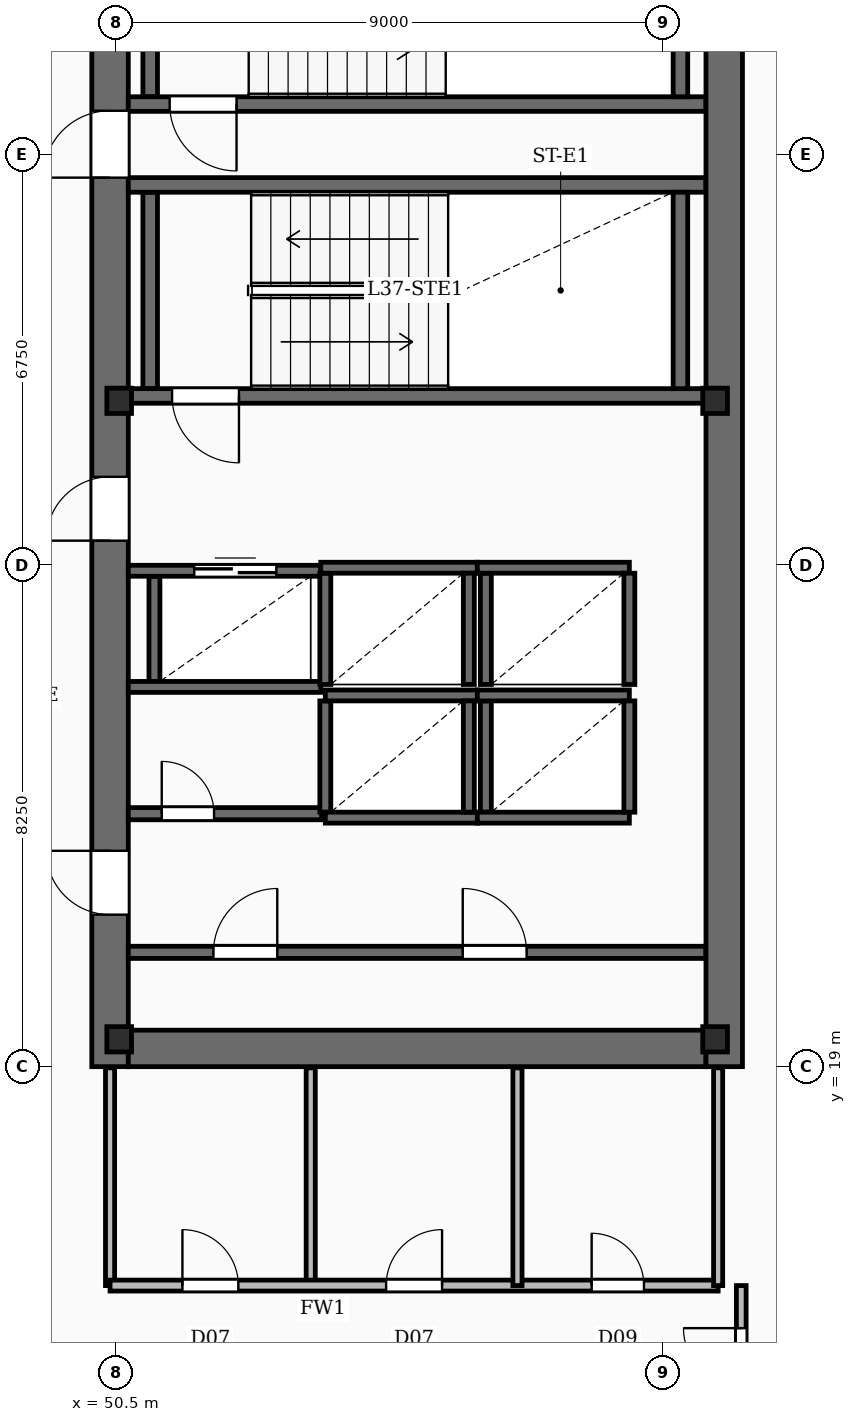
"""IFC4 building model, lengths in metres.
Left out: names, types, materials, properties, quantities, classifications, styles, units other than length and angle.
Written with IfcOpenShell. Run it as: python <this file> out.ifc"""

import sys

from ifc_helpers import new_model, si_unit, direction, frame, frame_2d, origin, origin_2d, place, context, subcontext, project, spatial, rectangle, i_section, extrude, element, fill, save


model = new_model("IFC4")
c1 = context("Model", 3, precision=1e-05, world=origin(), true_north=direction((0.0, 1.0)))
c2 = subcontext(c1, "Body", "Model", "MODEL_VIEW")
j1 = project(units=[si_unit("LENGTHUNIT", "METRE"), si_unit("PLANEANGLEUNIT", "RADIAN")], contexts=[c1])
p1 = place(None, origin())
s1 = spatial("IfcSite", under=j1, at=p1, CompositionType="ELEMENT")
p2 = place(p1, origin())
s2 = spatial("IfcBuilding", under=s1, at=p2, CompositionType="ELEMENT")
p3 = place(p2, frame((0.0, 0.0, 158.45)))
s3 = spatial("IfcBuildingStorey", under=s2, at=p3, CompositionType="ELEMENT", Elevation=158.45)
p4 = place(p3, frame((50.4, 19.0, -0.45), z_axis=(0.0, 0.0, 1.0), x_axis=(0.0, 1.0, 0.0)))
e1 = element("IfcWall", 1, at=p4, inside=s3, PredefinedType="SHEAR", context=c2, shape_type="SweptSolid", body=[
    extrude(rectangle(XDim=20.8, YDim=0.6, at=frame_2d((10.4, 0.0))), origin(), (0.0, 0.0, 1.0), 3.93),
])
p5 = place(p4, frame((2.5, 0.0, 0.45)))
e2 = element("IfcOpeningElement", 2, at=p5, cuts=e1, PredefinedType="OPENING", context=c2, shape_type="SweptSolid", body=[
    extrude(rectangle(XDim=1.05, YDim=2.15, at=frame_2d((0.525, 1.075))), frame((0.0, 0.31, 0.0), z_axis=(0.0, -1.0, 0.0), x_axis=(1.0, 0.0, 0.0)), (0.0, 0.0, 1.0), 0.62),
])
p6 = place(p4, frame((8.65, 0.0, 0.45)))
e3 = element("IfcOpeningElement", 3, at=p6, cuts=e1, PredefinedType="OPENING", context=c2, shape_type="SweptSolid", body=[
    extrude(rectangle(XDim=1.05, YDim=2.15, at=frame_2d((0.525, 1.075))), frame((0.0, 0.31, 0.0), z_axis=(0.0, -1.0, 0.0), x_axis=(1.0, 0.0, 0.0)), (0.0, 0.0, 1.0), 0.62),
])
p7 = place(p4, frame((14.62, 0.0, 0.45)))
e4 = element("IfcOpeningElement", 4, at=p7, cuts=e1, PredefinedType="OPENING", context=c2, shape_type="SweptSolid", body=[
    extrude(rectangle(XDim=1.1, YDim=2.15, at=frame_2d((0.55, 1.075))), frame((0.0, 0.31, 0.0), z_axis=(0.0, -1.0, 0.0), x_axis=(1.0, 0.0, 0.0)), (0.0, 0.0, 1.0), 0.62),
])
p8 = place(p3, frame((60.5, 19.0, -0.45), z_axis=(0.0, 0.0, 1.0), x_axis=(0.0, 1.0, 0.0)))
e5 = element("IfcWall", 5, at=p8, inside=s3, PredefinedType="SHEAR", context=c2, shape_type="SweptSolid", body=[
    extrude(rectangle(XDim=20.8, YDim=0.6, at=frame_2d((10.4, 0.0))), origin(), (0.0, 0.0, 1.0), 3.93),
])
p9 = place(p3, frame((50.7, 19.3, -0.45), z_axis=(0.0, 0.0, 1.0), x_axis=(1.0, 0.0, 0.0)))
e6 = element("IfcWall", 6, at=p9, inside=s3, PredefinedType="SHEAR", context=c2, shape_type="SweptSolid", body=[
    extrude(rectangle(XDim=9.5, YDim=0.6, at=frame_2d((4.75, 0.0))), origin(), (0.0, 0.0, 1.0), 3.93),
])
for number, where, z_axis, x_axis in (
    (7, (50.55, 19.45, -0.45), (0.0, 0.0, 1.0), (1.0, 0.0, 0.0)),
    (8, (60.35, 19.45, -0.45), (0.0, 0.0, 1.0), (1.0, 0.0, 0.0)),
    (9, (50.55, 29.95, -0.45), (0.0, 0.0, 1.0), (1.0, 0.0, 0.0)),
    (10, (60.35, 29.95, -0.45), (0.0, 0.0, 1.0), (1.0, 0.0, 0.0)),
):
    element("IfcColumn", number, at=place(p3, frame(where, z_axis=z_axis, x_axis=x_axis)), inside=s3, PredefinedType="COLUMN", context=c2, shape_type="SweptSolid", body=[
        extrude(i_section(OverallWidth=0.406, OverallDepth=0.416, WebThickness=0.03, FlangeThickness=0.048, FilletRadius=0.02, at=origin_2d()), origin(), (0.0, 0.0, 1.0), 3.93),
    ])
p10 = place(p3, frame((60.2, 30.03, 0.0), z_axis=(0.0, 0.0, 1.0), x_axis=(-1.0, 0.0, 0.0)))
e11 = element("IfcWall", 11, at=p10, inside=s3, PredefinedType="SOLIDWALL", context=c2, shape_type="SweptSolid", body=[
    extrude(rectangle(XDim=9.5, YDim=0.24, at=frame_2d((4.75, 0.0))), origin(), (0.0, 0.0, 1.0), 3.48),
])
p11 = place(p10, frame((7.68, 0.0, 0.0)))
e12 = element("IfcOpeningElement", 12, at=p11, cuts=e11, PredefinedType="OPENING", context=c2, shape_type="SweptSolid", body=[
    extrude(rectangle(XDim=1.1, YDim=2.15, at=frame_2d((0.55, 1.075))), frame((0.0, 0.13, 0.0), z_axis=(0.0, -1.0, 0.0), x_axis=(1.0, 0.0, 0.0)), (0.0, 0.0, 1.0), 0.26),
])
p12 = place(p3, frame((50.7, 33.5, 0.0), z_axis=(0.0, 0.0, 1.0), x_axis=(1.0, 0.0, 0.0)))
e13 = element("IfcWall", 13, at=p12, inside=s3, PredefinedType="SOLIDWALL", context=c2, shape_type="SweptSolid", body=[
    extrude(rectangle(XDim=9.5, YDim=0.24, at=frame_2d((4.75, 0.0))), origin(), (0.0, 0.0, 1.0), 3.48),
])
for number, where, z_axis, x_axis in (
    (14, (51.06, 30.15, 0.0), (0.0, 0.0, 1.0), (0.0, 1.0, 0.0)),
    (15, (59.78, 30.15, 0.0), (0.0, 0.0, 1.0), (0.0, 1.0, 0.0)),
):
    element("IfcWall", number, at=place(p3, frame(where, z_axis=z_axis, x_axis=x_axis)), inside=s3, PredefinedType="SOLIDWALL", context=c2, shape_type="SweptSolid", body=[
        extrude(rectangle(XDim=3.23, YDim=0.24, at=frame_2d((1.615, 0.0))), origin(), (0.0, 0.0, 1.0), 3.48),
    ])
p13 = place(p3, frame((60.2, 34.83, 0.0), z_axis=(0.0, 0.0, 1.0), x_axis=(-1.0, 0.0, 0.0)))
e16 = element("IfcWall", 16, at=p13, inside=s3, PredefinedType="SOLIDWALL", context=c2, shape_type="SweptSolid", body=[
    extrude(rectangle(XDim=9.5, YDim=0.24, at=frame_2d((4.75, 0.0))), origin(), (0.0, 0.0, 1.0), 3.48),
])
p14 = place(p13, frame((7.72, 0.0, 0.0)))
e17 = element("IfcOpeningElement", 17, at=p14, cuts=e16, PredefinedType="OPENING", context=c2, shape_type="SweptSolid", body=[
    extrude(rectangle(XDim=1.1, YDim=2.15, at=frame_2d((0.55, 1.075))), frame((0.0, 0.13, 0.0), z_axis=(0.0, -1.0, 0.0), x_axis=(1.0, 0.0, 0.0)), (0.0, 0.0, 1.0), 0.26),
])
for number, where, z_axis, x_axis in (
    (18, (51.06, 34.95, 0.0), (0.0, 0.0, 1.0), (0.0, 1.0, 0.0)),
    (19, (59.78, 34.95, 0.0), (0.0, 0.0, 1.0), (0.0, 1.0, 0.0)),
):
    element("IfcWall", number, at=place(p3, frame(where, z_axis=z_axis, x_axis=x_axis)), inside=s3, PredefinedType="SOLIDWALL", context=c2, shape_type="SweptSolid", body=[
        extrude(rectangle(XDim=3.15, YDim=0.24, at=frame_2d((1.575, 0.0))), origin(), (0.0, 0.0, 1.0), 3.48),
    ])
for number, where, z_axis, x_axis in (
    (20, (53.94, 25.105, 0.0), (0.0, 0.0, 1.0), (1.0, 0.0, 0.0)),
    (21, (53.94, 23.095, 0.0), (0.0, 0.0, 1.0), (1.0, 0.0, 0.0)),
):
    element("IfcWall", number, at=place(p3, frame(where, z_axis=z_axis, x_axis=x_axis)), inside=s3, PredefinedType="SOLIDWALL", context=c2, shape_type="SweptSolid", body=[
        extrude(rectangle(XDim=2.5, YDim=0.18, at=frame_2d((1.25, 0.0))), origin(), (0.0, 0.0, 1.0), 3.48),
    ])
for number, where, z_axis, x_axis in (
    (22, (53.94, 23.185, 0.0), (0.0, 0.0, 1.0), (0.0, 1.0, 0.0)),
    (23, (56.3, 23.185, 0.0), (0.0, 0.0, 1.0), (0.0, 1.0, 0.0)),
):
    element("IfcWall", number, at=place(p3, frame(where, z_axis=z_axis, x_axis=x_axis)), inside=s3, PredefinedType="SOLIDWALL", context=c2, shape_type="SweptSolid", body=[
        extrude(rectangle(XDim=1.83, YDim=0.18, at=frame_2d((0.915, 0.0))), origin(), (0.0, 0.0, 1.0), 3.48),
    ])
for number, where, z_axis, x_axis in (
    (24, (56.44, 25.105, 0.0), (0.0, 0.0, 1.0), (1.0, 0.0, 0.0)),
    (25, (56.44, 23.095, 0.0), (0.0, 0.0, 1.0), (1.0, 0.0, 0.0)),
):
    element("IfcWall", number, at=place(p3, frame(where, z_axis=z_axis, x_axis=x_axis)), inside=s3, PredefinedType="SOLIDWALL", context=c2, shape_type="SweptSolid", body=[
        extrude(rectangle(XDim=2.5, YDim=0.18, at=frame_2d((1.25, 0.0))), origin(), (0.0, 0.0, 1.0), 3.48),
    ])
for number, where, z_axis, x_axis in (
    (26, (56.58, 23.185, 0.0), (0.0, 0.0, 1.0), (0.0, 1.0, 0.0)),
    (27, (58.94, 23.185, 0.0), (0.0, 0.0, 1.0), (0.0, 1.0, 0.0)),
):
    element("IfcWall", number, at=place(p3, frame(where, z_axis=z_axis, x_axis=x_axis)), inside=s3, PredefinedType="SOLIDWALL", context=c2, shape_type="SweptSolid", body=[
        extrude(rectangle(XDim=1.83, YDim=0.18, at=frame_2d((0.915, 0.0))), origin(), (0.0, 0.0, 1.0), 3.48),
    ])
p15 = place(p3, frame((53.865, 27.205, 0.0), z_axis=(0.0, 0.0, 1.0), x_axis=(1.0, 0.0, 0.0)))
e28 = element("IfcWall", 28, at=p15, inside=s3, PredefinedType="SOLIDWALL", context=c2, shape_type="SweptSolid", body=[
    extrude(rectangle(XDim=2.575, YDim=0.18, at=frame_2d((1.288, 0.0))), origin(), (0.0, 0.0, 1.0), 3.48),
])
for number, where, z_axis, x_axis in (
    (29, (53.94, 25.285, 0.0), (0.0, 0.0, 1.0), (0.0, 1.0, 0.0)),
    (30, (56.3, 25.285, 0.0), (0.0, 0.0, 1.0), (0.0, 1.0, 0.0)),
):
    element("IfcWall", number, at=place(p3, frame(where, z_axis=z_axis, x_axis=x_axis)), inside=s3, PredefinedType="SOLIDWALL", context=c2, shape_type="SweptSolid", body=[
        extrude(rectangle(XDim=1.83, YDim=0.18, at=frame_2d((0.915, 0.0))), origin(), (0.0, 0.0, 1.0), 3.48),
    ])
p16 = place(p3, frame((56.44, 27.205, 0.0), z_axis=(0.0, 0.0, 1.0), x_axis=(1.0, 0.0, 0.0)))
e31 = element("IfcWall", 31, at=p16, inside=s3, PredefinedType="SOLIDWALL", context=c2, shape_type="SweptSolid", body=[
    extrude(rectangle(XDim=2.5, YDim=0.18, at=frame_2d((1.25, 0.0))), origin(), (0.0, 0.0, 1.0), 3.48),
])
for number, where, z_axis, x_axis in (
    (32, (56.58, 25.285, 0.0), (0.0, 0.0, 1.0), (0.0, 1.0, 0.0)),
    (33, (58.94, 25.285, 0.0), (0.0, 0.0, 1.0), (0.0, 1.0, 0.0)),
):
    element("IfcWall", number, at=place(p3, frame(where, z_axis=z_axis, x_axis=x_axis)), inside=s3, PredefinedType="SOLIDWALL", context=c2, shape_type="SweptSolid", body=[
        extrude(rectangle(XDim=1.83, YDim=0.18, at=frame_2d((0.915, 0.0))), origin(), (0.0, 0.0, 1.0), 3.48),
    ])
p17 = place(p3, frame((50.7, 27.155, 0.0), z_axis=(0.0, 0.0, 1.0), x_axis=(1.0, 0.0, 0.0)))
e34 = element("IfcWall", 34, at=p17, inside=s3, PredefinedType="SOLIDWALL", context=c2, shape_type="SweptSolid", body=[
    extrude(rectangle(XDim=3.165, YDim=0.18, at=frame_2d((1.583, 0.0))), origin(), (0.0, 0.0, 1.0), 3.48),
])
p18 = place(p17, frame((1.085, 0.0, 0.0)))
e35 = element("IfcOpeningElement", 35, at=p18, cuts=e34, PredefinedType="OPENING", context=c2, shape_type="SweptSolid", body=[
    extrude(rectangle(XDim=1.35, YDim=2.3, at=frame_2d((0.675, 1.15))), frame((0.0, 0.1, 0.0), z_axis=(0.0, -1.0, 0.0), x_axis=(1.0, 0.0, 0.0)), (0.0, 0.0, 1.0), 0.2),
])
p19 = place(p3, frame((50.7, 25.245, 0.0), z_axis=(0.0, 0.0, 1.0), x_axis=(1.0, 0.0, 0.0)))
e36 = element("IfcWall", 36, at=p19, inside=s3, PredefinedType="SOLIDWALL", context=c2, shape_type="SweptSolid", body=[
    extrude(rectangle(XDim=3.165, YDim=0.18, at=frame_2d((1.583, 0.0))), origin(), (0.0, 0.0, 1.0), 3.48),
])
p20 = place(p3, frame((51.13, 25.335, 0.0), z_axis=(0.0, 0.0, 1.0), x_axis=(0.0, 1.0, 0.0)))
e37 = element("IfcWall", 37, at=p20, inside=s3, PredefinedType="SOLIDWALL", context=c2, shape_type="SweptSolid", body=[
    extrude(rectangle(XDim=1.73, YDim=0.18, at=frame_2d((0.865, 0.0))), origin(), (0.0, 0.0, 1.0), 3.48),
])
p21 = place(p3, frame((50.7, 20.88, 0.0), z_axis=(0.0, 0.0, 1.0), x_axis=(1.0, 0.0, 0.0)))
e38 = element("IfcWall", 38, at=p21, inside=s3, PredefinedType="SOLIDWALL", context=c2, shape_type="SweptSolid", body=[
    extrude(rectangle(XDim=9.5, YDim=0.2, at=frame_2d((4.75, 0.0))), origin(), (0.0, 0.0, 1.0), 2.54),
])
p22 = place(p21, frame((1.4, 0.0, 0.0)))
e39 = element("IfcOpeningElement", 39, at=p22, cuts=e38, PredefinedType="OPENING", context=c2, shape_type="SweptSolid", body=[
    extrude(rectangle(XDim=1.05, YDim=2.15, at=frame_2d((0.525, 1.075))), frame((0.0, 0.11, 0.0), z_axis=(0.0, -1.0, 0.0), x_axis=(1.0, 0.0, 0.0)), (0.0, 0.0, 1.0), 0.22),
])
p23 = place(p21, frame((5.5, 0.0, 0.0)))
e40 = element("IfcOpeningElement", 40, at=p23, cuts=e38, PredefinedType="OPENING", context=c2, shape_type="SweptSolid", body=[
    extrude(rectangle(XDim=1.05, YDim=2.15, at=frame_2d((0.525, 1.075))), frame((0.0, 0.11, 0.0), z_axis=(0.0, -1.0, 0.0), x_axis=(1.0, 0.0, 0.0)), (0.0, 0.0, 1.0), 0.22),
])
p24 = place(p3, frame((50.7, 23.16, 0.0), z_axis=(0.0, 0.0, 1.0), x_axis=(1.0, 0.0, 0.0)))
e41 = element("IfcWall", 41, at=p24, inside=s3, PredefinedType="SOLIDWALL", context=c2, shape_type="SweptSolid", body=[
    extrude(rectangle(XDim=3.18, YDim=0.2, at=frame_2d((1.59, 0.0))), origin(), (0.0, 0.0, 1.0), 2.54),
])
p25 = place(p24, frame((0.55, 0.0, 0.0)))
e42 = element("IfcOpeningElement", 42, at=p25, cuts=e41, PredefinedType="OPENING", context=c2, shape_type="SweptSolid", body=[
    extrude(rectangle(XDim=0.86, YDim=2.05, at=frame_2d((0.43, 1.025))), frame((0.0, 0.11, 0.0), z_axis=(0.0, -1.0, 0.0), x_axis=(1.0, 0.0, 0.0)), (0.0, 0.0, 1.0), 0.22),
])
for number, where, z_axis, x_axis in (
    (43, (53.7, 15.4, 0.0), (0.0, 0.0, 1.0), (0.0, 1.0, 0.0)),
    (44, (57.1, 15.4, 0.0), (0.0, 0.0, 1.0), (0.0, 1.0, 0.0)),
):
    element("IfcWall", number, at=place(p3, frame(where, z_axis=z_axis, x_axis=x_axis)), inside=s3, PredefinedType="PARTITIONING", context=c2, shape_type="SweptSolid", body=[
        extrude(rectangle(XDim=3.58, YDim=0.15, at=frame_2d((1.79, 0.0))), origin(), (0.0, 0.0, 1.0), 2.54),
    ])
p26 = place(p3, frame((50.4, 15.4, 0.0), z_axis=(0.0, 0.0, 1.0), x_axis=(1.0, 0.0, 0.0)))
e45 = element("IfcWall", 45, at=p26, inside=s3, PredefinedType="SOLIDWALL", context=c2, shape_type="SweptSolid", body=[
    extrude(rectangle(XDim=10.0, YDim=0.18, at=frame_2d((5.0, 0.0))), origin(), (0.0, 0.0, 1.0), 2.54),
])
p27 = place(p26, frame((1.19, 0.0, 0.0)))
e46 = element("IfcOpeningElement", 46, at=p27, cuts=e45, PredefinedType="OPENING", context=c2, shape_type="SweptSolid", body=[
    extrude(rectangle(XDim=0.92, YDim=2.1, at=frame_2d((0.46, 1.05))), frame((0.0, 0.1, 0.0), z_axis=(0.0, -1.0, 0.0), x_axis=(1.0, 0.0, 0.0)), (0.0, 0.0, 1.0), 0.2),
])
p28 = place(p26, frame((4.54, 0.0, 0.0)))
e47 = element("IfcOpeningElement", 47, at=p28, cuts=e45, PredefinedType="OPENING", context=c2, shape_type="SweptSolid", body=[
    extrude(rectangle(XDim=0.92, YDim=2.1, at=frame_2d((0.46, 1.05))), frame((0.0, 0.1, 0.0), z_axis=(0.0, -1.0, 0.0), x_axis=(1.0, 0.0, 0.0)), (0.0, 0.0, 1.0), 0.2),
])
p29 = place(p26, frame((7.92, 0.0, 0.0)))
e48 = element("IfcOpeningElement", 48, at=p29, cuts=e45, PredefinedType="OPENING", context=c2, shape_type="SweptSolid", body=[
    extrude(rectangle(XDim=0.86, YDim=2.05, at=frame_2d((0.43, 1.025))), frame((0.0, 0.1, 0.0), z_axis=(0.0, -1.0, 0.0), x_axis=(1.0, 0.0, 0.0)), (0.0, 0.0, 1.0), 0.2),
])
for number, where, z_axis, x_axis in (
    (49, (50.4, 15.4, 0.0), (0.0, 0.0, 1.0), (0.0, 1.0, 0.0)),
    (50, (60.4, 15.4, 0.0), (0.0, 0.0, 1.0), (0.0, 1.0, 0.0)),
):
    element("IfcWall", number, at=place(p3, frame(where, z_axis=z_axis, x_axis=x_axis)), inside=s3, PredefinedType="PARTITIONING", context=c2, shape_type="SweptSolid", body=[
        extrude(rectangle(XDim=3.58, YDim=0.15, at=frame_2d((1.79, 0.0))), origin(), (0.0, 0.0, 1.0), 2.54),
    ])
p30 = place(p3, frame((60.78, 13.1, 0.0), z_axis=(0.0, 0.0, 1.0), x_axis=(0.0, 1.0, 0.0)))
e51 = element("IfcWall", 51, at=p30, inside=s3, PredefinedType="PARTITIONING", context=c2, shape_type="SweptSolid", body=[
    extrude(rectangle(XDim=2.3, YDim=0.16, at=frame_2d((1.15, 0.0))), origin(), (0.0, 0.0, 1.0), 2.54),
])
p31 = place(p30, frame((0.65, 0.0, 0.0)))
e52 = element("IfcOpeningElement", 52, at=p31, cuts=e51, PredefinedType="OPENING", context=c2, shape_type="SweptSolid", body=[
    extrude(rectangle(XDim=0.95, YDim=2.15, at=frame_2d((0.475, 1.075))), frame((0.0, 0.09, 0.0), z_axis=(0.0, -1.0, 0.0), x_axis=(1.0, 0.0, 0.0)), (0.0, 0.0, 1.0), 0.18),
])
p32 = place(p5, origin())
e53 = element("IfcDoor", 53, at=p32, inside=s3, OperationType="SINGLE_SWING_RIGHT", PredefinedType="DOOR", context=c2, shape_type="SweptSolid", body=[
    extrude(rectangle(XDim=1.05, YDim=2.15, at=frame_2d((0.525, 1.075))), frame((0.0, 0.025, 0.0), z_axis=(0.0, -1.0, 0.0), x_axis=(1.0, 0.0, 0.0)), (0.0, 0.0, 1.0), 0.05),
])
fill(e2, e53)
p33 = place(p6, origin())
e54 = element("IfcDoor", 54, at=p33, inside=s3, OperationType="SINGLE_SWING_LEFT", PredefinedType="DOOR", context=c2, shape_type="SweptSolid", body=[
    extrude(rectangle(XDim=1.05, YDim=2.15, at=frame_2d((0.525, 1.075))), frame((0.0, 0.025, 0.0), z_axis=(0.0, -1.0, 0.0), x_axis=(1.0, 0.0, 0.0)), (0.0, 0.0, 1.0), 0.05),
])
fill(e3, e54)
p34 = place(p7, origin())
e55 = element("IfcDoor", 55, at=p34, inside=s3, OperationType="SINGLE_SWING_LEFT", PredefinedType="DOOR", context=c2, shape_type="SweptSolid", body=[
    extrude(rectangle(XDim=1.1, YDim=2.15, at=frame_2d((0.55, 1.075))), frame((0.0, 0.025, 0.0), z_axis=(0.0, -1.0, 0.0), x_axis=(1.0, 0.0, 0.0)), (0.0, 0.0, 1.0), 0.05),
])
fill(e4, e55)
p35 = place(p11, origin())
e56 = element("IfcDoor", 56, at=p35, inside=s3, OperationType="SINGLE_SWING_LEFT", PredefinedType="DOOR", context=c2, shape_type="SweptSolid", body=[
    extrude(rectangle(XDim=1.1, YDim=2.15, at=frame_2d((0.55, 1.075))), frame((0.0, 0.025, 0.0), z_axis=(0.0, -1.0, 0.0), x_axis=(1.0, 0.0, 0.0)), (0.0, 0.0, 1.0), 0.05),
])
fill(e12, e56)
p36 = place(p14, origin())
e57 = element("IfcDoor", 57, at=p36, inside=s3, OperationType="SINGLE_SWING_LEFT", PredefinedType="DOOR", context=c2, shape_type="SweptSolid", body=[
    extrude(rectangle(XDim=1.1, YDim=2.15, at=frame_2d((0.55, 1.075))), frame((0.0, 0.025, 0.0), z_axis=(0.0, -1.0, 0.0), x_axis=(1.0, 0.0, 0.0)), (0.0, 0.0, 1.0), 0.05),
])
fill(e17, e57)
p37 = place(p18, origin())
e58 = element("IfcDoor", 58, at=p37, inside=s3, OperationType="DOUBLE_DOOR_SLIDING", PredefinedType="DOOR", context=c2, shape_type="SweptSolid", body=[
    extrude(rectangle(XDim=1.35, YDim=2.3, at=frame_2d((0.675, 1.15))), frame((0.0, 0.025, 0.0), z_axis=(0.0, -1.0, 0.0), x_axis=(1.0, 0.0, 0.0)), (0.0, 0.0, 1.0), 0.05),
])
fill(e35, e58)
p38 = place(p22, origin())
e59 = element("IfcDoor", 59, at=p38, inside=s3, OperationType="SINGLE_SWING_RIGHT", PredefinedType="DOOR", context=c2, shape_type="SweptSolid", body=[
    extrude(rectangle(XDim=1.05, YDim=2.15, at=frame_2d((0.525, 1.075))), frame((0.0, 0.025, 0.0), z_axis=(0.0, -1.0, 0.0), x_axis=(1.0, 0.0, 0.0)), (0.0, 0.0, 1.0), 0.05),
])
fill(e39, e59)
p39 = place(p23, origin())
e60 = element("IfcDoor", 60, at=p39, inside=s3, OperationType="SINGLE_SWING_LEFT", PredefinedType="DOOR", context=c2, shape_type="SweptSolid", body=[
    extrude(rectangle(XDim=1.05, YDim=2.15, at=frame_2d((0.525, 1.075))), frame((0.0, 0.025, 0.0), z_axis=(0.0, -1.0, 0.0), x_axis=(1.0, 0.0, 0.0)), (0.0, 0.0, 1.0), 0.05),
])
fill(e40, e60)
p40 = place(p25, origin())
e61 = element("IfcDoor", 61, at=p40, inside=s3, OperationType="SINGLE_SWING_LEFT", PredefinedType="DOOR", context=c2, shape_type="SweptSolid", body=[
    extrude(rectangle(XDim=0.86, YDim=2.05, at=frame_2d((0.43, 1.025))), frame((0.0, 0.025, 0.0), z_axis=(0.0, -1.0, 0.0), x_axis=(1.0, 0.0, 0.0)), (0.0, 0.0, 1.0), 0.05),
])
fill(e42, e61)
p41 = place(p27, origin())
e62 = element("IfcDoor", 62, at=p41, inside=s3, OperationType="SINGLE_SWING_LEFT", PredefinedType="DOOR", context=c2, shape_type="SweptSolid", body=[
    extrude(rectangle(XDim=0.92, YDim=2.1, at=frame_2d((0.46, 1.05))), frame((0.0, 0.025, 0.0), z_axis=(0.0, -1.0, 0.0), x_axis=(1.0, 0.0, 0.0)), (0.0, 0.0, 1.0), 0.05),
])
fill(e46, e62)
p42 = place(p28, origin())
e63 = element("IfcDoor", 63, at=p42, inside=s3, OperationType="SINGLE_SWING_RIGHT", PredefinedType="DOOR", context=c2, shape_type="SweptSolid", body=[
    extrude(rectangle(XDim=0.92, YDim=2.1, at=frame_2d((0.46, 1.05))), frame((0.0, 0.025, 0.0), z_axis=(0.0, -1.0, 0.0), x_axis=(1.0, 0.0, 0.0)), (0.0, 0.0, 1.0), 0.05),
])
fill(e47, e63)
p43 = place(p29, origin())
e64 = element("IfcDoor", 64, at=p43, inside=s3, OperationType="SINGLE_SWING_LEFT", PredefinedType="DOOR", context=c2, shape_type="SweptSolid", body=[
    extrude(rectangle(XDim=0.86, YDim=2.05, at=frame_2d((0.43, 1.025))), frame((0.0, 0.025, 0.0), z_axis=(0.0, -1.0, 0.0), x_axis=(1.0, 0.0, 0.0)), (0.0, 0.0, 1.0), 0.05),
])
fill(e48, e64)
p44 = place(p31, origin())
e65 = element("IfcDoor", 65, at=p44, inside=s3, OperationType="SINGLE_SWING_RIGHT", PredefinedType="DOOR", context=c2, shape_type="SweptSolid", body=[
    extrude(rectangle(XDim=0.95, YDim=2.15, at=frame_2d((0.475, 1.075))), frame((0.0, 0.025, 0.0), z_axis=(0.0, -1.0, 0.0), x_axis=(1.0, 0.0, 0.0)), (0.0, 0.0, 1.0), 0.05),
])
fill(e52, e65)
save(model, sys.argv[1])
